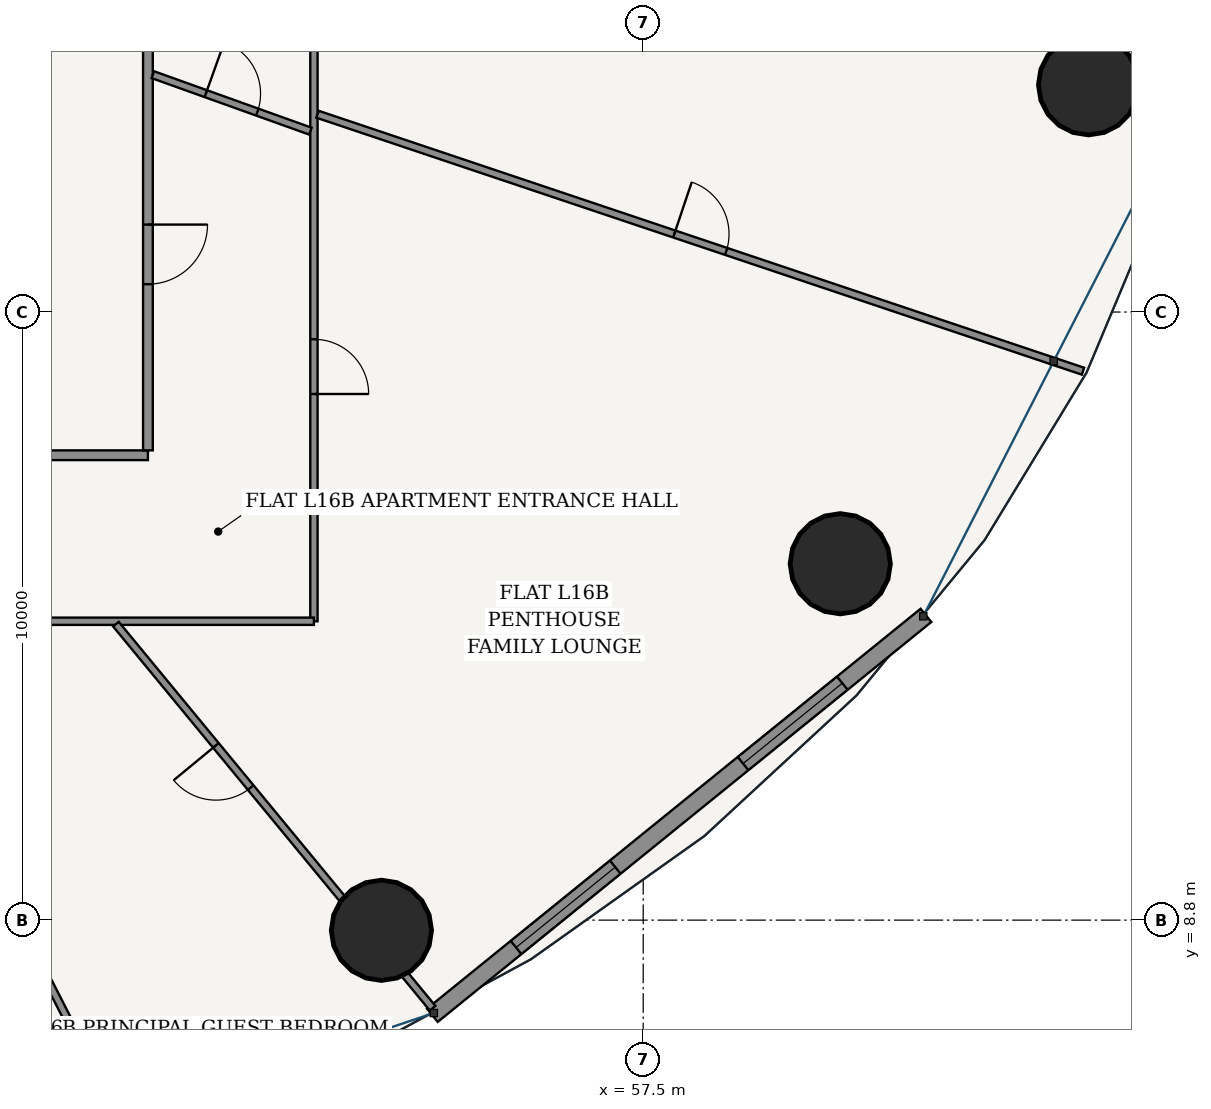
"""IFC4 building model, lengths in metres.
Left out: names, types, materials, properties, quantities, classifications, styles, units other than length and angle.
Written with IfcOpenShell. Run it as: python <this file> out.ifc"""

import sys

from ifc_helpers import new_model, si_unit, direction, frame, frame_2d, origin, origin_2d, place, context, subcontext, project, spatial, rectangle, hollow_circle, extrude, source, transform, mapped, element, fill, save


model = new_model("IFC4")
c1 = context("Model", 3, precision=1e-05, world=origin(), true_north=direction((-0.2419218956, 0.970295726276)))
c2 = subcontext(c1, "Body", "Model", "MODEL_VIEW")
j1 = project(units=[si_unit("LENGTHUNIT", "METRE"), si_unit("PLANEANGLEUNIT", "RADIAN")], contexts=[c1])
p1 = place(None, origin())
s1 = spatial("IfcSite", under=j1, at=p1, CompositionType="ELEMENT")
p2 = place(p1, origin())
s2 = spatial("IfcBuilding", under=s1, at=p2, CompositionType="ELEMENT")
p3 = place(p2, frame((0.0, 0.0, 63.6)))
s3 = spatial("IfcBuildingStorey", under=s2, at=p3, CompositionType="ELEMENT", Elevation=63.6)
for number, where, z_axis, x_axis in (
    (1, (53.195, 8.632, 0.0), (0.0, 0.0, 1.0), (1.0, 0.0, 0.0)),
    (2, (60.741, 14.661, 0.0), (0.0, 0.0, 1.0), (1.0, 0.0, 0.0)),
    (3, (64.824, 22.537, 0.0), (0.0, 0.0, 1.0), (1.0, 0.0, 0.0)),
):
    element("IfcColumn", number, at=place(p3, frame(where, z_axis=z_axis, x_axis=x_axis)), inside=s3, PredefinedType="COLUMN", context=c2, shape_type="SweptSolid", body=[
        extrude(hollow_circle(Radius=0.825, WallThickness=0.05, at=origin_2d()), origin(), (0.0, 0.0, 1.0), 3.6),
    ])
p4 = place(p3, frame((54.033, 7.235, 0.0), z_axis=(0.0, 0.0, 1.0), x_axis=(0.777016782851, 0.629479879875, 0.0)))
e4 = element("IfcWall", 4, at=p4, inside=s3, PredefinedType="SOLIDWALL", context=c2, shape_type="SweptSolid", body=[
    extrude(rectangle(XDim=10.447, YDim=0.28, at=frame_2d((5.223, 0.0))), origin(), (0.0, 0.0, 1.0), 3.32),
])
p5 = place(p4, frame((1.771, 0.0, 0.85)))
e5 = element("IfcOpeningElement", 5, at=p5, cuts=e4, PredefinedType="OPENING", context=c2, shape_type="SweptSolid", body=[
    extrude(rectangle(XDim=2.1, YDim=1.95, at=frame_2d((1.05, 0.975))), frame((0.0, 0.15, 0.0), z_axis=(0.0, -1.0, 0.0), x_axis=(1.0, 0.0, 0.0)), (0.0, 0.0, 1.0), 0.3),
])
p6 = place(p4, frame((6.576, 0.0, 0.85)))
e6 = element("IfcOpeningElement", 6, at=p6, cuts=e4, PredefinedType="OPENING", context=c2, shape_type="SweptSolid", body=[
    extrude(rectangle(XDim=2.1, YDim=1.95, at=frame_2d((1.05, 0.975))), frame((0.0, 0.15, 0.0), z_axis=(0.0, -1.0, 0.0), x_axis=(1.0, 0.0, 0.0)), (0.0, 0.0, 1.0), 0.3),
])
p7 = place(p3, frame((26.645, 16.445, 0.0), z_axis=(0.0, 0.0, 1.0), x_axis=(1.0, 0.0, 0.0)))
e7 = element("IfcWall", 7, at=p7, inside=s3, PredefinedType="PARTITIONING", context=c2, shape_type="SweptSolid", body=[
    extrude(rectangle(XDim=22.71, YDim=0.16, at=frame_2d((11.355, 0.0))), origin(), (0.0, 0.0, 1.0), 2.688),
])
p8 = place(p3, frame((49.355, 16.525, 0.0), z_axis=(0.0, 0.0, 1.0), x_axis=(0.0, 1.0, 0.0)))
e8 = element("IfcWall", 8, at=p8, inside=s3, PredefinedType="PARTITIONING", context=c2, shape_type="SweptSolid", body=[
    extrude(rectangle(XDim=20.55, YDim=0.16, at=frame_2d((10.275, 0.0))), origin(), (0.0, 0.0, 1.0), 2.688),
])
p9 = place(p8, frame((2.733, 0.0, 0.0)))
e9 = element("IfcOpeningElement", 9, at=p9, cuts=e8, PredefinedType="OPENING", context=c2, shape_type="SweptSolid", body=[
    extrude(rectangle(XDim=0.98, YDim=2.2, at=frame_2d((0.49, 1.1))), frame((0.0, 0.09, 0.0), z_axis=(0.0, -1.0, 0.0), x_axis=(1.0, 0.0, 0.0)), (0.0, 0.0, 1.0), 0.18),
])
p10 = place(p3, frame((52.085, 34.324, 0.0), z_axis=(0.0, 0.0, 1.0), x_axis=(0.0, -1.0, 0.0)))
e10 = element("IfcWall", 10, at=p10, inside=s3, PredefinedType="PARTITIONING", context=c2, shape_type="SweptSolid", body=[
    extrude(rectangle(XDim=20.609, YDim=0.12, at=frame_2d((10.305, 0.0))), origin(), (0.0, 0.0, 1.0), 2.688),
])
p11 = place(p10, frame((15.972, 0.0, 0.0)))
e11 = element("IfcOpeningElement", 11, at=p11, cuts=e10, PredefinedType="OPENING", context=c2, shape_type="SweptSolid", body=[
    extrude(rectangle(XDim=0.9, YDim=2.15, at=frame_2d((0.45, 1.075))), frame((0.0, 0.07, 0.0), z_axis=(0.0, -1.0, 0.0), x_axis=(1.0, 0.0, 0.0)), (0.0, 0.0, 1.0), 0.14),
])
p12 = place(p10, frame((3.058, 0.0, 0.0)))
e12 = element("IfcOpeningElement", 12, at=p12, cuts=e10, PredefinedType="OPENING", context=c2, shape_type="SweptSolid", body=[
    extrude(rectangle(XDim=0.9, YDim=2.15, at=frame_2d((0.45, 1.075))), frame((0.0, 0.07, 0.0), z_axis=(0.0, -1.0, 0.0), x_axis=(1.0, 0.0, 0.0)), (0.0, 0.0, 1.0), 0.14),
])
p13 = place(p3, frame((52.085, 13.715, 0.0), z_axis=(0.0, 0.0, 1.0), x_axis=(-1.0, 0.0, 0.0)))
e13 = element("IfcWall", 13, at=p13, inside=s3, PredefinedType="PARTITIONING", context=c2, shape_type="SweptSolid", body=[
    extrude(rectangle(XDim=28.17, YDim=0.12, at=frame_2d((14.085, 0.0))), origin(), (0.0, 0.0, 1.0), 2.688),
])
p14 = place(p13, frame((12.891, 0.0, 0.0)))
e14 = element("IfcOpeningElement", 14, at=p14, cuts=e13, PredefinedType="OPENING", context=c2, shape_type="SweptSolid", body=[
    extrude(rectangle(XDim=0.9, YDim=2.15, at=frame_2d((0.45, 1.075))), frame((0.0, 0.07, 0.0), z_axis=(0.0, -1.0, 0.0), x_axis=(1.0, 0.0, 0.0)), (0.0, 0.0, 1.0), 0.14),
])
p15 = place(p3, frame((44.717, 13.66, 0.0), z_axis=(0.0, 0.0, 1.0), x_axis=(0.455131303234, -0.890424335256, 0.0)))
e15 = element("IfcWall", 15, at=p15, inside=s3, PredefinedType="PARTITIONING", context=c2, shape_type="SweptSolid", body=[
    extrude(rectangle(XDim=9.562, YDim=0.12, at=frame_2d((4.781, 0.0))), origin(), (0.0, 0.0, 1.0), 2.762),
])
p16 = place(p15, frame((4.331, 0.0, 0.0)))
e16 = element("IfcOpeningElement", 16, at=p16, cuts=e15, PredefinedType="OPENING", context=c2, shape_type="SweptSolid", body=[
    extrude(rectangle(XDim=0.9, YDim=2.15, at=frame_2d((0.45, 1.075))), frame((0.0, 0.07, 0.0), z_axis=(0.0, -1.0, 0.0), x_axis=(1.0, 0.0, 0.0)), (0.0, 0.0, 1.0), 0.14),
])
p17 = place(p3, frame((48.829, 13.667, 0.0), z_axis=(0.0, 0.0, 1.0), x_axis=(0.636177533893, -0.771542704826, 0.0)))
e17 = element("IfcWall", 17, at=p17, inside=s3, PredefinedType="PARTITIONING", context=c2, shape_type="SweptSolid", body=[
    extrude(rectangle(XDim=8.187, YDim=0.12, at=frame_2d((4.093, 0.0))), origin(), (0.0, 0.0, 1.0), 2.688),
])
p18 = place(p17, frame((2.584, 0.0, 0.0)))
e18 = element("IfcOpeningElement", 18, at=p18, cuts=e17, PredefinedType="OPENING", context=c2, shape_type="SweptSolid", body=[
    extrude(rectangle(XDim=0.9, YDim=2.15, at=frame_2d((0.45, 1.075))), frame((0.0, 0.07, 0.0), z_axis=(0.0, -1.0, 0.0), x_axis=(1.0, 0.0, 0.0)), (0.0, 0.0, 1.0), 0.14),
])
p19 = place(p3, frame((52.144, 22.052, 0.0), z_axis=(0.0, 0.0, 1.0), x_axis=(0.948023034133, -0.318201707653, 0.0)))
e19 = element("IfcWall", 19, at=p19, inside=s3, PredefinedType="PARTITIONING", context=c2, shape_type="SweptSolid", body=[
    extrude(rectangle(XDim=13.279, YDim=0.12, at=frame_2d((6.639, 0.0))), origin(), (0.0, 0.0, 1.0), 2.762),
])
p20 = place(p19, frame((6.189, 0.0, 0.0)))
e20 = element("IfcOpeningElement", 20, at=p20, cuts=e19, PredefinedType="OPENING", context=c2, shape_type="SweptSolid", body=[
    extrude(rectangle(XDim=0.9, YDim=2.15, at=frame_2d((0.45, 1.075))), frame((0.0, 0.07, 0.0), z_axis=(0.0, -1.0, 0.0), x_axis=(1.0, 0.0, 0.0)), (0.0, 0.0, 1.0), 0.14),
])
p21 = place(p3, frame((49.435, 22.703, 0.0), z_axis=(0.0, 0.0, 1.0), x_axis=(0.941406362049, -0.337274460186, 0.0)))
e21 = element("IfcWall", 21, at=p21, inside=s3, PredefinedType="PARTITIONING", context=c2, shape_type="SweptSolid", body=[
    extrude(rectangle(XDim=2.753, YDim=0.12, at=frame_2d((1.376, 0.0))), origin(), (0.0, 0.0, 1.0), 3.32),
])
p22 = place(p21, frame((0.927, 0.0, 0.0)))
e22 = element("IfcOpeningElement", 22, at=p22, cuts=e21, PredefinedType="OPENING", context=c2, shape_type="SweptSolid", body=[
    extrude(rectangle(XDim=0.9, YDim=2.15, at=frame_2d((0.45, 1.075))), frame((0.0, 0.07, 0.0), z_axis=(0.0, -1.0, 0.0), x_axis=(1.0, 0.0, 0.0)), (0.0, 0.0, 1.0), 0.14),
])
m1 = source(origin(), c2, "Body", "SweptSolid", [
    extrude(rectangle(XDim=2.1, YDim=1.95, at=frame_2d((1.05, 0.975))), frame((0.0, 0.03, 0.0), z_axis=(0.0, -1.0, 0.0), x_axis=(1.0, 0.0, 0.0)), (0.0, 0.0, 1.0), 0.06),
])
p23 = place(p5, origin())
e23 = element("IfcWindow", 23, at=p23, inside=s3, PartitioningType="SINGLE_PANEL", PredefinedType="WINDOW", context=c2, shape_type="MappedRepresentation", body=[
    mapped(m1, transform((0.0, 0.0, 0.0), scale=1.0)),
])
fill(e5, e23)
p24 = place(p6, origin())
e24 = element("IfcWindow", 24, at=p24, inside=s3, PartitioningType="SINGLE_PANEL", PredefinedType="WINDOW", context=c2, shape_type="MappedRepresentation", body=[
    mapped(m1, transform((0.0, 0.0, 0.0), scale=1.0)),
])
fill(e6, e24)
m2 = source(origin(), c2, "Body", "SweptSolid", [
    extrude(rectangle(XDim=0.98, YDim=2.2, at=frame_2d((0.49, 1.1))), frame((0.0, 0.025, 0.0), z_axis=(0.0, -1.0, 0.0), x_axis=(1.0, 0.0, 0.0)), (0.0, 0.0, 1.0), 0.05),
])
p25 = place(p9, frame((0.98, 0.0, 0.0), z_axis=(0.0, 0.0, 1.0), x_axis=(-1.0, 0.0, 0.0)))
e25 = element("IfcDoor", 25, at=p25, inside=s3, OperationType="SINGLE_SWING_LEFT", PredefinedType="DOOR", context=c2, shape_type="MappedRepresentation", body=[
    mapped(m2, transform((0.0, 0.0, 0.0), scale=1.0)),
])
fill(e9, e25)
m3 = source(origin(), c2, "Body", "SweptSolid", [
    extrude(rectangle(XDim=0.9, YDim=2.15, at=frame_2d((0.45, 1.075))), frame((0.0, 0.025, 0.0), z_axis=(0.0, -1.0, 0.0), x_axis=(1.0, 0.0, 0.0)), (0.0, 0.0, 1.0), 0.05),
])
p26 = place(p22, origin())
e26 = element("IfcDoor", 26, at=p26, inside=s3, OperationType="SINGLE_SWING_LEFT", PredefinedType="DOOR", context=c2, shape_type="MappedRepresentation", body=[
    mapped(m3, transform((0.0, 0.0, 0.0), scale=1.0)),
])
fill(e22, e26)
p27 = place(p11, origin())
e27 = element("IfcDoor", 27, at=p27, inside=s3, OperationType="SINGLE_SWING_RIGHT", PredefinedType="DOOR", context=c2, shape_type="MappedRepresentation", body=[
    mapped(m3, transform((0.0, 0.0, 0.0), scale=1.0)),
])
fill(e11, e27)
p28 = place(p20, origin())
e28 = element("IfcDoor", 28, at=p28, inside=s3, OperationType="SINGLE_SWING_LEFT", PredefinedType="DOOR", context=c2, shape_type="MappedRepresentation", body=[
    mapped(m3, transform((0.0, 0.0, 0.0), scale=1.0)),
])
fill(e20, e28)
p29 = place(p18, frame((0.9, 0.0, 0.0), z_axis=(0.0, 0.0, 1.0), x_axis=(-1.0, 0.0, 0.0)))
e29 = element("IfcDoor", 29, at=p29, inside=s3, OperationType="SINGLE_SWING_RIGHT", PredefinedType="DOOR", context=c2, shape_type="MappedRepresentation", body=[
    mapped(m3, transform((0.0, 0.0, 0.0), scale=1.0)),
])
fill(e18, e29)
save(model, sys.argv[1])
